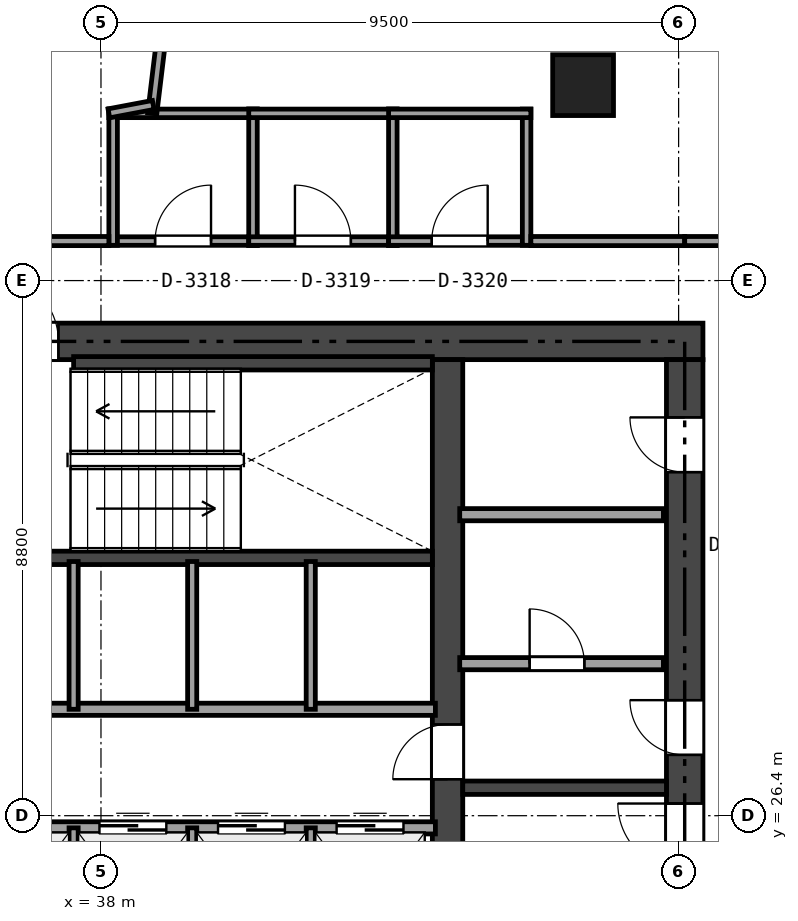
"""IFC4 building model, lengths in metres.
Left out: names, types, materials, properties, quantities, classifications, styles, units other than length and angle.
Written with IfcOpenShell. Run it as: python <this file> out.ifc"""

import sys

from ifc_helpers import new_model, si_unit, direction, frame, frame_2d, origin, origin_2d, place, context, subcontext, project, spatial, rectangle, extrude, element, fill, save


model = new_model("IFC4")
c1 = context("Model", 3, precision=1e-05, world=origin(), true_north=direction((0.0, 1.0)))
c2 = subcontext(c1, "Body", "Model", "MODEL_VIEW")
j1 = project(units=[si_unit("LENGTHUNIT", "METRE"), si_unit("PLANEANGLEUNIT", "RADIAN")], contexts=[c1])
p1 = place(None, origin())
s1 = spatial("IfcSite", under=j1, at=p1, CompositionType="ELEMENT")
p2 = place(p1, origin())
s2 = spatial("IfcBuilding", under=s1, at=p2, CompositionType="ELEMENT")
p3 = place(p2, frame((0.0, 0.0, 125.7)))
s3 = spatial("IfcBuildingStorey", under=s2, at=p3, CompositionType="ELEMENT", Elevation=125.7)
p4 = place(p3, frame((26.5, 34.2, 0.0), z_axis=(0.0, 0.0, 1.0), x_axis=(1.0, 0.0, 0.0)))
e1 = element("IfcWall", 1, at=p4, inside=s3, PredefinedType="SHEAR", context=c2, shape_type="SweptSolid", body=[
    extrude(rectangle(XDim=21.4, YDim=0.6, at=frame_2d((10.7, 0.0))), origin(), (0.0, 0.0, 1.0), 3.32),
])
p5 = place(p4, frame((9.7, 0.0, 0.0)))
e2 = element("IfcOpeningElement", 2, at=p5, cuts=e1, PredefinedType="OPENING", context=c2, shape_type="SweptSolid", body=[
    extrude(rectangle(XDim=1.1, YDim=2.15, at=frame_2d((0.55, 1.075))), frame((0.0, 0.31, 0.0), z_axis=(0.0, -1.0, 0.0), x_axis=(1.0, 0.0, 0.0)), (0.0, 0.0, 1.0), 0.62),
])
p6 = place(p4, frame((1.95, 0.0, 0.0)))
e3 = element("IfcOpeningElement", 3, at=p6, cuts=e1, PredefinedType="OPENING", context=c2, shape_type="SweptSolid", body=[
    extrude(rectangle(XDim=0.9, YDim=2.1, at=frame_2d((0.45, 1.05))), frame((0.0, 0.31, 0.0), z_axis=(0.0, -1.0, 0.0), x_axis=(1.0, 0.0, 0.0)), (0.0, 0.0, 1.0), 0.62),
])
p7 = place(p4, frame((6.25, 0.0, 0.0)))
e4 = element("IfcOpeningElement", 4, at=p7, cuts=e1, PredefinedType="OPENING", context=c2, shape_type="SweptSolid", body=[
    extrude(rectangle(XDim=0.9, YDim=2.1, at=frame_2d((0.45, 1.05))), frame((0.0, 0.31, 0.0), z_axis=(0.0, -1.0, 0.0), x_axis=(1.0, 0.0, 0.0)), (0.0, 0.0, 1.0), 0.62),
])
p8 = place(p3, frame((47.6, 18.9, 0.0), z_axis=(0.0, 0.0, 1.0), x_axis=(0.0, 1.0, 0.0)))
e5 = element("IfcWall", 5, at=p8, inside=s3, PredefinedType="SHEAR", context=c2, shape_type="SweptSolid", body=[
    extrude(rectangle(XDim=15.0, YDim=0.6, at=frame_2d((7.5, 0.0))), origin(), (0.0, 0.0, 1.0), 3.32),
])
p9 = place(p8, frame((6.6, 0.0, 0.0)))
e6 = element("IfcOpeningElement", 6, at=p9, cuts=e5, PredefinedType="OPENING", context=c2, shape_type="SweptSolid", body=[
    extrude(rectangle(XDim=1.1, YDim=2.15, at=frame_2d((0.55, 1.075))), frame((0.0, 0.31, 0.0), z_axis=(0.0, -1.0, 0.0), x_axis=(1.0, 0.0, 0.0)), (0.0, 0.0, 1.0), 0.62),
])
p10 = place(p8, frame((8.5, 0.0, 0.0)))
e7 = element("IfcOpeningElement", 7, at=p10, cuts=e5, PredefinedType="OPENING", context=c2, shape_type="SweptSolid", body=[
    extrude(rectangle(XDim=0.9, YDim=2.1, at=frame_2d((0.45, 1.05))), frame((0.0, 0.31, 0.0), z_axis=(0.0, -1.0, 0.0), x_axis=(1.0, 0.0, 0.0)), (0.0, 0.0, 1.0), 0.62),
])
p11 = place(p8, frame((13.15, 0.0, 0.0)))
e8 = element("IfcOpeningElement", 8, at=p11, cuts=e5, PredefinedType="OPENING", context=c2, shape_type="SweptSolid", body=[
    extrude(rectangle(XDim=0.9, YDim=2.1, at=frame_2d((0.45, 1.05))), frame((0.0, 0.31, 0.0), z_axis=(0.0, -1.0, 0.0), x_axis=(1.0, 0.0, 0.0)), (0.0, 0.0, 1.0), 0.62),
])
p12 = place(p3, frame((43.7, 18.9, 0.0), z_axis=(0.0, 0.0, 1.0), x_axis=(0.0, 1.0, 0.0)))
e9 = element("IfcWall", 9, at=p12, inside=s3, PredefinedType="SHEAR", context=c2, shape_type="SweptSolid", body=[
    extrude(rectangle(XDim=15.0, YDim=0.5, at=frame_2d((7.5, 0.0))), origin(), (0.0, 0.0, 1.0), 3.32),
])
p13 = place(p12, frame((8.1, 0.0, 0.0)))
e10 = element("IfcOpeningElement", 10, at=p13, cuts=e9, PredefinedType="OPENING", context=c2, shape_type="SweptSolid", body=[
    extrude(rectangle(XDim=0.9, YDim=2.1, at=frame_2d((0.45, 1.05))), frame((0.0, 0.26, 0.0), z_axis=(0.0, -1.0, 0.0), x_axis=(1.0, 0.0, 0.0)), (0.0, 0.0, 1.0), 0.52),
])
p14 = place(p3, frame((43.95, 26.86, 0.0), z_axis=(0.0, 0.0, 1.0), x_axis=(1.0, 0.0, 0.0)))
e11 = element("IfcWall", 11, at=p14, inside=s3, PredefinedType="SHEAR", context=c2, shape_type="SweptSolid", body=[
    extrude(rectangle(XDim=3.35, YDim=0.22, at=frame_2d((1.675, 0.0))), origin(), (0.0, 0.0, 1.0), 3.32),
])
p15 = place(p3, frame((35.84, 30.64, 0.0), z_axis=(0.0, 0.0, 1.0), x_axis=(1.0, 0.0, 0.0)))
e12 = element("IfcWall", 12, at=p15, inside=s3, PredefinedType="SHEAR", context=c2, shape_type="SweptSolid", body=[
    extrude(rectangle(XDim=7.61, YDim=0.22, at=frame_2d((3.805, 0.0))), origin(), (0.0, 0.0, 1.0), 3.32),
])
p16 = place(p3, frame((37.55, 33.84, 0.0), z_axis=(0.0, 0.0, 1.0), x_axis=(1.0, 0.0, 0.0)))
e13 = element("IfcWall", 13, at=p16, inside=s3, PredefinedType="SHEAR", context=c2, shape_type="SweptSolid", body=[
    extrude(rectangle(XDim=5.9, YDim=0.22, at=frame_2d((2.95, 0.0))), origin(), (0.0, 0.0, 1.0), 3.32),
])
p17 = place(p3, frame((45.929, 38.414, -0.405), z_axis=(0.0, 0.0, 1.0), x_axis=(1.0, 0.0, 0.0)))
e14 = element("IfcColumn", 14, at=p17, inside=s3, PredefinedType="COLUMN", context=c2, shape_type="SweptSolid", body=[
    extrude(rectangle(XDim=1.0, YDim=1.0, at=origin_2d()), origin(), (0.0, 0.0, 1.0), 3.725),
])
p18 = place(p3, frame((43.9, 28.9, 0.0), z_axis=(0.0, 0.0, 1.0), x_axis=(1.0, 0.0, 0.0)))
e15 = element("IfcWall", 15, at=p18, inside=s3, PredefinedType="SOLIDWALL", context=c2, shape_type="SweptSolid", body=[
    extrude(rectangle(XDim=3.35, YDim=0.2, at=frame_2d((1.675, 0.0))), origin(), (0.0, 0.0, 1.0), 3.32),
])
p19 = place(p18, frame((1.15, 0.0, 0.0)))
e16 = element("IfcOpeningElement", 16, at=p19, cuts=e15, PredefinedType="OPENING", context=c2, shape_type="SweptSolid", body=[
    extrude(rectangle(XDim=0.9, YDim=2.1, at=frame_2d((0.45, 1.05))), frame((0.0, 0.11, 0.0), z_axis=(0.0, -1.0, 0.0), x_axis=(1.0, 0.0, 0.0)), (0.0, 0.0, 1.0), 0.22),
])
p20 = place(p3, frame((43.9, 31.35, 0.0), z_axis=(0.0, 0.0, 1.0), x_axis=(1.0, 0.0, 0.0)))
e17 = element("IfcWall", 17, at=p20, inside=s3, PredefinedType="SOLIDWALL", context=c2, shape_type="SweptSolid", body=[
    extrude(rectangle(XDim=3.35, YDim=0.2, at=frame_2d((1.675, 0.0))), origin(), (0.0, 0.0, 1.0), 3.32),
])
p21 = place(p3, frame((35.62, 28.15, 0.0), z_axis=(0.0, 0.0, 1.0), x_axis=(1.0, 0.0, 0.0)))
e18 = element("IfcWall", 18, at=p21, inside=s3, PredefinedType="SOLIDWALL", context=c2, shape_type="SweptSolid", body=[
    extrude(rectangle(XDim=7.88, YDim=0.2, at=frame_2d((3.94, 0.0))), origin(), (0.0, 0.0, 1.0), 3.32),
])
p22 = place(p3, frame((35.62, 26.2, 0.0), z_axis=(0.0, 0.0, 1.0), x_axis=(1.0, 0.0, 0.0)))
e19 = element("IfcWall", 19, at=p22, inside=s3, PredefinedType="SOLIDWALL", context=c2, shape_type="SweptSolid", body=[
    extrude(rectangle(XDim=7.88, YDim=0.2, at=frame_2d((3.94, 0.0))), origin(), (0.0, 0.0, 1.0), 3.32),
])
p23 = place(p22, frame((0.405, 0.0, 0.0)))
e20 = element("IfcOpeningElement", 20, at=p23, cuts=e19, PredefinedType="OPENING", context=c2, shape_type="SweptSolid", body=[
    extrude(rectangle(XDim=1.1, YDim=2.15, at=frame_2d((0.55, 1.075))), frame((0.0, 0.11, 0.0), z_axis=(0.0, -1.0, 0.0), x_axis=(1.0, 0.0, 0.0)), (0.0, 0.0, 1.0), 0.22),
])
p24 = place(p22, frame((2.355, 0.0, 0.0)))
e21 = element("IfcOpeningElement", 21, at=p24, cuts=e19, PredefinedType="OPENING", context=c2, shape_type="SweptSolid", body=[
    extrude(rectangle(XDim=1.1, YDim=2.15, at=frame_2d((0.55, 1.075))), frame((0.0, 0.11, 0.0), z_axis=(0.0, -1.0, 0.0), x_axis=(1.0, 0.0, 0.0)), (0.0, 0.0, 1.0), 0.22),
])
p25 = place(p22, frame((4.305, 0.0, 0.0)))
e22 = element("IfcOpeningElement", 22, at=p25, cuts=e19, PredefinedType="OPENING", context=c2, shape_type="SweptSolid", body=[
    extrude(rectangle(XDim=1.1, YDim=2.15, at=frame_2d((0.55, 1.075))), frame((0.0, 0.11, 0.0), z_axis=(0.0, -1.0, 0.0), x_axis=(1.0, 0.0, 0.0)), (0.0, 0.0, 1.0), 0.22),
])
p26 = place(p22, frame((6.255, 0.0, 0.0)))
e23 = element("IfcOpeningElement", 23, at=p26, cuts=e19, PredefinedType="OPENING", context=c2, shape_type="SweptSolid", body=[
    extrude(rectangle(XDim=1.1, YDim=2.15, at=frame_2d((0.55, 1.075))), frame((0.0, 0.11, 0.0), z_axis=(0.0, -1.0, 0.0), x_axis=(1.0, 0.0, 0.0)), (0.0, 0.0, 1.0), 0.22),
])
for number, where, z_axis, x_axis in (
    (24, (37.55, 28.15, 0.0), (0.0, 0.0, 1.0), (0.0, 1.0, 0.0)),
    (25, (39.5, 28.15, 0.0), (0.0, 0.0, 1.0), (0.0, 1.0, 0.0)),
    (26, (41.45, 28.15, 0.0), (0.0, 0.0, 1.0), (0.0, 1.0, 0.0)),
):
    element("IfcWall", number, at=place(p3, frame(where, z_axis=z_axis, x_axis=x_axis)), inside=s3, PredefinedType="PARTITIONING", context=c2, shape_type="SweptSolid", body=[
        extrude(rectangle(XDim=2.43, YDim=0.15, at=frame_2d((1.215, 0.0))), origin(), (0.0, 0.0, 1.0), 3.32),
    ])
for number, where, z_axis, x_axis in (
    (27, (37.55, 23.65, 0.0), (0.0, 0.0, 1.0), (0.0, 1.0, 0.0)),
    (28, (39.5, 23.65, 0.0), (0.0, 0.0, 1.0), (0.0, 1.0, 0.0)),
    (29, (41.45, 23.65, 0.0), (0.0, 0.0, 1.0), (0.0, 1.0, 0.0)),
):
    element("IfcWall", number, at=place(p3, frame(where, z_axis=z_axis, x_axis=x_axis)), inside=s3, PredefinedType="PARTITIONING", context=c2, shape_type="SweptSolid", body=[
        extrude(rectangle(XDim=2.55, YDim=0.15, at=frame_2d((1.275, 0.0))), origin(), (0.0, 0.0, 1.0), 2.841),
    ])
p27 = place(p3, frame((38.13, 35.85, 0.0), z_axis=(0.0, 0.0, 1.0), x_axis=(1.0, 0.0, 0.0)))
e30 = element("IfcWall", 30, at=p27, inside=s3, PredefinedType="PARTITIONING", context=c2, shape_type="SweptSolid", body=[
    extrude(rectangle(XDim=2.44, YDim=0.14, at=frame_2d((1.22, 0.0))), origin(), (0.0, 0.0, 1.0), 3.32),
])
p28 = place(p27, frame((0.76, 0.0, 0.0)))
e31 = element("IfcOpeningElement", 31, at=p28, cuts=e30, PredefinedType="OPENING", context=c2, shape_type="SweptSolid", body=[
    extrude(rectangle(XDim=0.92, YDim=2.1, at=frame_2d((0.46, 1.05))), frame((0.0, 0.08, 0.0), z_axis=(0.0, -1.0, 0.0), x_axis=(1.0, 0.0, 0.0)), (0.0, 0.0, 1.0), 0.16),
])
p29 = place(p3, frame((40.5, 35.78, 0.0), z_axis=(0.0, 0.0, 1.0), x_axis=(0.0, 1.0, 0.0)))
e32 = element("IfcWall", 32, at=p29, inside=s3, PredefinedType="PARTITIONING", context=c2, shape_type="SweptSolid", body=[
    extrude(rectangle(XDim=2.24, YDim=0.14, at=frame_2d((1.12, 0.0))), origin(), (0.0, 0.0, 1.0), 2.949),
])
p30 = place(p3, frame((40.57, 37.95, 0.0), z_axis=(0.0, 0.0, 1.0), x_axis=(-1.0, 0.0, 0.0)))
e33 = element("IfcWall", 33, at=p30, inside=s3, PredefinedType="PARTITIONING", context=c2, shape_type="SweptSolid", body=[
    extrude(rectangle(XDim=2.44, YDim=0.14, at=frame_2d((1.22, 0.0))), origin(), (0.0, 0.0, 1.0), 2.949),
])
p31 = place(p3, frame((38.2, 38.02, 0.0), z_axis=(0.0, 0.0, 1.0), x_axis=(0.0, -1.0, 0.0)))
e34 = element("IfcWall", 34, at=p31, inside=s3, PredefinedType="PARTITIONING", context=c2, shape_type="SweptSolid", body=[
    extrude(rectangle(XDim=2.24, YDim=0.14, at=frame_2d((1.12, 0.0))), origin(), (0.0, 0.0, 1.0), 2.949),
])
p32 = place(p3, frame((40.43, 35.85, 0.0), z_axis=(0.0, 0.0, 1.0), x_axis=(1.0, 0.0, 0.0)))
e35 = element("IfcWall", 35, at=p32, inside=s3, PredefinedType="PARTITIONING", context=c2, shape_type="SweptSolid", body=[
    extrude(rectangle(XDim=2.44, YDim=0.14, at=frame_2d((1.22, 0.0))), origin(), (0.0, 0.0, 1.0), 3.32),
])
p33 = place(p32, frame((0.76, 0.0, 0.0)))
e36 = element("IfcOpeningElement", 36, at=p33, cuts=e35, PredefinedType="OPENING", context=c2, shape_type="SweptSolid", body=[
    extrude(rectangle(XDim=0.92, YDim=2.1, at=frame_2d((0.46, 1.05))), frame((0.0, 0.08, 0.0), z_axis=(0.0, -1.0, 0.0), x_axis=(1.0, 0.0, 0.0)), (0.0, 0.0, 1.0), 0.16),
])
p34 = place(p3, frame((42.8, 35.78, 0.0), z_axis=(0.0, 0.0, 1.0), x_axis=(0.0, 1.0, 0.0)))
e37 = element("IfcWall", 37, at=p34, inside=s3, PredefinedType="PARTITIONING", context=c2, shape_type="SweptSolid", body=[
    extrude(rectangle(XDim=2.24, YDim=0.14, at=frame_2d((1.12, 0.0))), origin(), (0.0, 0.0, 1.0), 2.949),
])
p35 = place(p3, frame((42.87, 37.95, 0.0), z_axis=(0.0, 0.0, 1.0), x_axis=(-1.0, 0.0, 0.0)))
e38 = element("IfcWall", 38, at=p35, inside=s3, PredefinedType="PARTITIONING", context=c2, shape_type="SweptSolid", body=[
    extrude(rectangle(XDim=2.44, YDim=0.14, at=frame_2d((1.22, 0.0))), origin(), (0.0, 0.0, 1.0), 3.32),
])
p36 = place(p3, frame((42.73, 35.85, 0.0), z_axis=(0.0, 0.0, 1.0), x_axis=(1.0, 0.0, 0.0)))
e39 = element("IfcWall", 39, at=p36, inside=s3, PredefinedType="PARTITIONING", context=c2, shape_type="SweptSolid", body=[
    extrude(rectangle(XDim=2.34, YDim=0.14, at=frame_2d((1.17, 0.0))), origin(), (0.0, 0.0, 1.0), 2.687),
])
p37 = place(p36, frame((0.71, 0.0, 0.0)))
e40 = element("IfcOpeningElement", 40, at=p37, cuts=e39, PredefinedType="OPENING", context=c2, shape_type="SweptSolid", body=[
    extrude(rectangle(XDim=0.92, YDim=2.1, at=frame_2d((0.46, 1.05))), frame((0.0, 0.08, 0.0), z_axis=(0.0, -1.0, 0.0), x_axis=(1.0, 0.0, 0.0)), (0.0, 0.0, 1.0), 0.16),
])
p38 = place(p3, frame((45.0, 35.78, 0.0), z_axis=(0.0, 0.0, 1.0), x_axis=(0.0, 1.0, 0.0)))
e41 = element("IfcWall", 41, at=p38, inside=s3, PredefinedType="PARTITIONING", context=c2, shape_type="SweptSolid", body=[
    extrude(rectangle(XDim=2.24, YDim=0.14, at=frame_2d((1.12, 0.0))), origin(), (0.0, 0.0, 1.0), 2.687),
])
p39 = place(p3, frame((45.07, 37.95, 0.0), z_axis=(0.0, 0.0, 1.0), x_axis=(-1.0, 0.0, 0.0)))
e42 = element("IfcWall", 42, at=p39, inside=s3, PredefinedType="PARTITIONING", context=c2, shape_type="SweptSolid", body=[
    extrude(rectangle(XDim=2.34, YDim=0.14, at=frame_2d((1.17, 0.0))), origin(), (0.0, 0.0, 1.0), 3.32),
])
p40 = place(p3, frame((39.665, 44.746, 0.0), z_axis=(0.0, 0.0, 1.0), x_axis=(-0.120078943637, -0.992764346305, 0.0)))
e43 = element("IfcWall", 43, at=p40, inside=s3, PredefinedType="PARTITIONING", context=c2, shape_type="SweptSolid", body=[
    extrude(rectangle(XDim=6.846, YDim=0.15, at=frame_2d((3.423, 0.0))), origin(), (0.0, 0.0, 1.0), 2.805),
])
p41 = place(p3, frame((45.07, 35.85, 0.0), z_axis=(0.0, 0.0, 1.0), x_axis=(1.0, 0.0, 0.0)))
e44 = element("IfcWall", 44, at=p41, inside=s3, PredefinedType="PARTITIONING", context=c2, shape_type="SweptSolid", body=[
    extrude(rectangle(XDim=2.53, YDim=0.15, at=frame_2d((1.265, 0.0))), origin(), (0.0, 0.0, 1.0), 2.805),
])
p42 = place(p3, frame((47.6, 35.85, 0.0), z_axis=(0.0, 0.0, 1.0), x_axis=(1.0, 0.0, 0.0)))
e45 = element("IfcWall", 45, at=p42, inside=s3, PredefinedType="PARTITIONING", context=c2, shape_type="SweptSolid", body=[
    extrude(rectangle(XDim=1.65, YDim=0.15, at=frame_2d((0.825, 0.0))), origin(), (0.0, 0.0, 1.0), 2.805),
])
p43 = place(p3, frame((26.8, 35.85, 0.0), z_axis=(0.0, 0.0, 1.0), x_axis=(1.0, 0.0, 0.0)))
e46 = element("IfcWall", 46, at=p43, inside=s3, PredefinedType="PARTITIONING", context=c2, shape_type="SweptSolid", body=[
    extrude(rectangle(XDim=11.33, YDim=0.15, at=frame_2d((5.665, 0.0))), origin(), (0.0, 0.0, 1.0), 2.687),
])
p44 = place(p43, frame((5.165, 0.0, 0.0)))
e47 = element("IfcOpeningElement", 47, at=p44, cuts=e46, PredefinedType="OPENING", context=c2, shape_type="SweptSolid", body=[
    extrude(rectangle(XDim=1.0, YDim=2.15, at=frame_2d((0.5, 1.075))), frame((0.0, 0.085, 0.0), z_axis=(0.0, -1.0, 0.0), x_axis=(1.0, 0.0, 0.0)), (0.0, 0.0, 1.0), 0.17),
])
p45 = place(p3, frame((38.13, 37.95, 0.0), z_axis=(0.0, 0.0, 1.0), x_axis=(0.982622104364, 0.185617348367, 0.0)))
e48 = element("IfcWall", 48, at=p45, inside=s3, PredefinedType="PARTITIONING", context=c2, shape_type="SweptSolid", body=[
    extrude(rectangle(XDim=0.743, YDim=0.15, at=frame_2d((0.372, 0.0))), origin(), (0.0, 0.0, 1.0), 2.949),
])
p46 = place(p9, origin())
e49 = element("IfcDoor", 49, at=p46, inside=s3, OperationType="SINGLE_SWING_RIGHT", PredefinedType="DOOR", context=c2, shape_type="SweptSolid", body=[
    extrude(rectangle(XDim=1.1, YDim=2.15, at=frame_2d((0.55, 1.075))), frame((0.0, 0.025, 0.0), z_axis=(0.0, -1.0, 0.0), x_axis=(1.0, 0.0, 0.0)), (0.0, 0.0, 1.0), 0.05),
])
fill(e6, e49)
p47 = place(p5, origin())
e50 = element("IfcDoor", 50, at=p47, inside=s3, OperationType="SINGLE_SWING_LEFT", PredefinedType="DOOR", context=c2, shape_type="SweptSolid", body=[
    extrude(rectangle(XDim=1.1, YDim=2.15, at=frame_2d((0.55, 1.075))), frame((0.0, 0.025, 0.0), z_axis=(0.0, -1.0, 0.0), x_axis=(1.0, 0.0, 0.0)), (0.0, 0.0, 1.0), 0.05),
])
fill(e2, e50)
p48 = place(p13, origin())
e51 = element("IfcDoor", 51, at=p48, inside=s3, OperationType="SINGLE_SWING_LEFT", PredefinedType="DOOR", context=c2, shape_type="SweptSolid", body=[
    extrude(rectangle(XDim=0.9, YDim=2.1, at=frame_2d((0.45, 1.05))), frame((0.0, 0.025, 0.0), z_axis=(0.0, -1.0, 0.0), x_axis=(1.0, 0.0, 0.0)), (0.0, 0.0, 1.0), 0.05),
])
fill(e10, e51)
p49 = place(p10, origin())
e52 = element("IfcDoor", 52, at=p49, inside=s3, OperationType="SINGLE_SWING_RIGHT", PredefinedType="DOOR", context=c2, shape_type="SweptSolid", body=[
    extrude(rectangle(XDim=0.9, YDim=2.1, at=frame_2d((0.45, 1.05))), frame((0.0, 0.025, 0.0), z_axis=(0.0, -1.0, 0.0), x_axis=(1.0, 0.0, 0.0)), (0.0, 0.0, 1.0), 0.05),
])
fill(e7, e52)
p50 = place(p19, origin())
e53 = element("IfcDoor", 53, at=p50, inside=s3, OperationType="SINGLE_SWING_LEFT", PredefinedType="DOOR", context=c2, shape_type="SweptSolid", body=[
    extrude(rectangle(XDim=0.9, YDim=2.1, at=frame_2d((0.45, 1.05))), frame((0.0, 0.025, 0.0), z_axis=(0.0, -1.0, 0.0), x_axis=(1.0, 0.0, 0.0)), (0.0, 0.0, 1.0), 0.05),
])
fill(e16, e53)
p51 = place(p11, origin())
e54 = element("IfcDoor", 54, at=p51, inside=s3, OperationType="SINGLE_SWING_RIGHT", PredefinedType="DOOR", context=c2, shape_type="SweptSolid", body=[
    extrude(rectangle(XDim=0.9, YDim=2.1, at=frame_2d((0.45, 1.05))), frame((0.0, 0.025, 0.0), z_axis=(0.0, -1.0, 0.0), x_axis=(1.0, 0.0, 0.0)), (0.0, 0.0, 1.0), 0.05),
])
fill(e8, e54)
p52 = place(p24, origin())
e55 = element("IfcDoor", 55, at=p52, inside=s3, OperationType="SLIDING_TO_LEFT", PredefinedType="DOOR", context=c2, shape_type="SweptSolid", body=[
    extrude(rectangle(XDim=1.1, YDim=2.15, at=frame_2d((0.55, 1.075))), frame((0.0, 0.025, 0.0), z_axis=(0.0, -1.0, 0.0), x_axis=(1.0, 0.0, 0.0)), (0.0, 0.0, 1.0), 0.05),
])
fill(e21, e55)
p53 = place(p25, origin())
e56 = element("IfcDoor", 56, at=p53, inside=s3, OperationType="SLIDING_TO_LEFT", PredefinedType="DOOR", context=c2, shape_type="SweptSolid", body=[
    extrude(rectangle(XDim=1.1, YDim=2.15, at=frame_2d((0.55, 1.075))), frame((0.0, 0.025, 0.0), z_axis=(0.0, -1.0, 0.0), x_axis=(1.0, 0.0, 0.0)), (0.0, 0.0, 1.0), 0.05),
])
fill(e22, e56)
p54 = place(p26, origin())
e57 = element("IfcDoor", 57, at=p54, inside=s3, OperationType="SLIDING_TO_LEFT", PredefinedType="DOOR", context=c2, shape_type="SweptSolid", body=[
    extrude(rectangle(XDim=1.1, YDim=2.15, at=frame_2d((0.55, 1.075))), frame((0.0, 0.025, 0.0), z_axis=(0.0, -1.0, 0.0), x_axis=(1.0, 0.0, 0.0)), (0.0, 0.0, 1.0), 0.05),
])
fill(e23, e57)
p55 = place(p28, origin())
e58 = element("IfcDoor", 58, at=p55, inside=s3, OperationType="SINGLE_SWING_RIGHT", PredefinedType="DOOR", context=c2, shape_type="SweptSolid", body=[
    extrude(rectangle(XDim=0.92, YDim=2.1, at=frame_2d((0.46, 1.05))), frame((0.0, 0.025, 0.0), z_axis=(0.0, -1.0, 0.0), x_axis=(1.0, 0.0, 0.0)), (0.0, 0.0, 1.0), 0.05),
])
fill(e31, e58)
p56 = place(p33, origin())
e59 = element("IfcDoor", 59, at=p56, inside=s3, OperationType="SINGLE_SWING_LEFT", PredefinedType="DOOR", context=c2, shape_type="SweptSolid", body=[
    extrude(rectangle(XDim=0.92, YDim=2.1, at=frame_2d((0.46, 1.05))), frame((0.0, 0.025, 0.0), z_axis=(0.0, -1.0, 0.0), x_axis=(1.0, 0.0, 0.0)), (0.0, 0.0, 1.0), 0.05),
])
fill(e36, e59)
p57 = place(p37, origin())
e60 = element("IfcDoor", 60, at=p57, inside=s3, OperationType="SINGLE_SWING_RIGHT", PredefinedType="DOOR", context=c2, shape_type="SweptSolid", body=[
    extrude(rectangle(XDim=0.92, YDim=2.1, at=frame_2d((0.46, 1.05))), frame((0.0, 0.025, 0.0), z_axis=(0.0, -1.0, 0.0), x_axis=(1.0, 0.0, 0.0)), (0.0, 0.0, 1.0), 0.05),
])
fill(e40, e60)
save(model, sys.argv[1])
